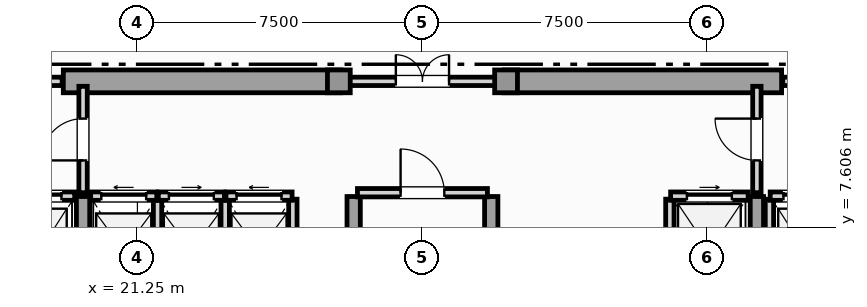
"""IFC4 building model, lengths in metres.
Left out: names, types, materials, properties, quantities, classifications, styles, units other than length and angle.
Written with IfcOpenShell. Run it as: python <this file> out.ifc"""

import sys

from ifc_helpers import new_model, si_unit, direction, frame, frame_2d, origin, origin_2d, place, context, subcontext, project, spatial, rectangle, extrude, element, fill, save


model = new_model("IFC4")
c1 = context("Model", 3, precision=1e-05, world=origin(), true_north=direction((0.0, 1.0)))
c2 = subcontext(c1, "Body", "Model", "MODEL_VIEW")
j1 = project(units=[si_unit("LENGTHUNIT", "METRE"), si_unit("PLANEANGLEUNIT", "RADIAN")], contexts=[c1])
p1 = place(None, origin())
s1 = spatial("IfcSite", under=j1, at=p1, CompositionType="ELEMENT")
p2 = place(p1, origin())
s2 = spatial("IfcBuilding", under=s1, at=p2, CompositionType="ELEMENT")
p3 = place(p2, frame((0.0, 0.0, 256.75)))
s3 = spatial("IfcBuildingStorey", under=s2, at=p3, CompositionType="ELEMENT", Elevation=256.75)
for number, where, z_axis, x_axis in (
    (1, (19.3, 11.45, 0.0), (0.0, 0.0, 1.0), (1.0, 0.0, 0.0)),
    (2, (30.9, 11.45, 0.0), (0.0, 0.0, 1.0), (1.0, 0.0, 0.0)),
):
    element("IfcWall", number, at=place(p3, frame(where, z_axis=z_axis, x_axis=x_axis)), inside=s3, PredefinedType="SHEAR", context=c2, shape_type="SweptSolid", body=[
        extrude(rectangle(XDim=7.3, YDim=0.6, at=frame_2d((3.65, 0.0))), origin(), (0.0, 0.0, 1.0), 3.65),
    ])
for number, where, z_axis, x_axis in (
    (3, (19.82, 0.92, 0.0), (0.0, 0.0, 1.0), (0.0, 1.0, 0.0)),
    (4, (26.94, 0.92, 0.0), (0.0, 0.0, 1.0), (0.0, 1.0, 0.0)),
    (5, (30.56, 0.92, 0.0), (0.0, 0.0, 1.0), (0.0, 1.0, 0.0)),
    (6, (37.55, 0.92, 0.0), (0.0, 0.0, 1.0), (0.0, 1.0, 0.0)),
):
    element("IfcWall", number, at=place(p3, frame(where, z_axis=z_axis, x_axis=x_axis)), inside=s3, PredefinedType="SHEAR", context=c2, shape_type="SweptSolid", body=[
        extrude(rectangle(XDim=7.5, YDim=0.35, at=frame_2d((3.75, 0.0))), origin(), (0.0, 0.0, 1.0), 3.65),
    ])
for number, where, z_axis, x_axis in (
    (7, (26.55, 11.45, 0.0), (0.0, 0.0, 1.0), (1.0, 0.0, 0.0)),
    (8, (30.95, 11.45, 0.0), (0.0, 0.0, 1.0), (1.0, 0.0, 0.0)),
):
    element("IfcColumn", number, at=place(p3, frame(where, z_axis=z_axis, x_axis=x_axis)), inside=s3, PredefinedType="COLUMN", context=c2, shape_type="SweptSolid", body=[
        extrude(rectangle(XDim=0.6, YDim=0.6, at=origin_2d()), origin(), (0.0, 0.0, 1.0), 3.85),
    ])
p4 = place(p3, frame((17.78, 8.43, 0.0), z_axis=(0.0, 0.0, 1.0), x_axis=(1.0, 0.0, 0.0)))
e9 = element("IfcWall", 9, at=p4, inside=s3, PredefinedType="SOLIDWALL", context=c2, shape_type="SweptSolid", body=[
    extrude(rectangle(XDim=1.82, YDim=0.22, at=frame_2d((0.91, 0.0))), origin(), (0.0, 0.0, 1.0), 3.65),
])
p5 = place(p4, frame((0.35, 0.0, 0.0)))
e10 = element("IfcOpeningElement", 10, at=p5, cuts=e9, PredefinedType="OPENING", context=c2, shape_type="SweptSolid", body=[
    extrude(rectangle(XDim=1.12, YDim=2.25, at=frame_2d((0.56, 1.125))), frame((0.0, 0.12, 0.0), z_axis=(0.0, -1.0, 0.0), x_axis=(1.0, 0.0, 0.0)), (0.0, 0.0, 1.0), 0.24),
])
p6 = place(p3, frame((37.88, 5.65, 0.0), z_axis=(0.0, 0.0, 1.0), x_axis=(0.0, 1.0, 0.0)))
e11 = element("IfcWall", 11, at=p6, inside=s3, PredefinedType="SOLIDWALL", context=c2, shape_type="SweptSolid", body=[
    extrude(rectangle(XDim=2.7, YDim=0.22, at=frame_2d((1.35, 0.0))), origin(), (0.0, 0.0, 1.0), 3.65),
])
p7 = place(p3, frame((37.9, 8.43, 0.0), z_axis=(0.0, 0.0, 1.0), x_axis=(1.0, 0.0, 0.0)))
e12 = element("IfcWall", 12, at=p7, inside=s3, PredefinedType="SOLIDWALL", context=c2, shape_type="SweptSolid", body=[
    extrude(rectangle(XDim=1.82, YDim=0.22, at=frame_2d((0.91, 0.0))), origin(), (0.0, 0.0, 1.0), 3.65),
])
p8 = place(p7, frame((0.35, 0.0, 0.0)))
e13 = element("IfcOpeningElement", 13, at=p8, cuts=e12, PredefinedType="OPENING", context=c2, shape_type="SweptSolid", body=[
    extrude(rectangle(XDim=1.12, YDim=2.25, at=frame_2d((0.56, 1.125))), frame((0.0, 0.12, 0.0), z_axis=(0.0, -1.0, 0.0), x_axis=(1.0, 0.0, 0.0)), (0.0, 0.0, 1.0), 0.24),
])
p9 = place(p3, frame((35.26, 5.65, 0.0), z_axis=(0.0, 0.0, 1.0), x_axis=(0.0, 1.0, 0.0)))
e14 = element("IfcWall", 14, at=p9, inside=s3, PredefinedType="SOLIDWALL", context=c2, shape_type="SweptSolid", body=[
    extrude(rectangle(XDim=2.7, YDim=0.22, at=frame_2d((1.35, 0.0))), origin(), (0.0, 0.0, 1.0), 3.65),
])
p10 = place(p3, frame((35.28, 8.43, 0.0), z_axis=(0.0, 0.0, 1.0), x_axis=(1.0, 0.0, 0.0)))
e15 = element("IfcWall", 15, at=p10, inside=s3, PredefinedType="SOLIDWALL", context=c2, shape_type="SweptSolid", body=[
    extrude(rectangle(XDim=2.04, YDim=0.22, at=frame_2d((1.02, 0.0))), origin(), (0.0, 0.0, 1.0), 3.65),
])
p11 = place(p10, frame((0.43, 0.0, 0.0)))
e16 = element("IfcOpeningElement", 16, at=p11, cuts=e15, PredefinedType="OPENING", context=c2, shape_type="SweptSolid", body=[
    extrude(rectangle(XDim=1.18, YDim=2.2, at=frame_2d((0.59, 1.1))), frame((0.0, 0.12, 0.0), z_axis=(0.0, -1.0, 0.0), x_axis=(1.0, 0.0, 0.0)), (0.0, 0.0, 1.0), 0.24),
])
p12 = place(p3, frame((21.78, 5.65, 0.0), z_axis=(0.0, 0.0, 1.0), x_axis=(0.0, 1.0, 0.0)))
e17 = element("IfcWall", 17, at=p12, inside=s3, PredefinedType="SOLIDWALL", context=c2, shape_type="SweptSolid", body=[
    extrude(rectangle(XDim=2.7, YDim=0.22, at=frame_2d((1.35, 0.0))), origin(), (0.0, 0.0, 1.0), 3.65),
])
p13 = place(p3, frame((20.02, 8.43, 0.0), z_axis=(0.0, 0.0, 1.0), x_axis=(1.0, 0.0, 0.0)))
e18 = element("IfcWall", 18, at=p13, inside=s3, PredefinedType="SOLIDWALL", context=c2, shape_type="SweptSolid", body=[
    extrude(rectangle(XDim=1.74, YDim=0.22, at=frame_2d((0.87, 0.0))), origin(), (0.0, 0.0, 1.0), 3.65),
])
p14 = place(p13, frame((0.28, 0.0, 0.0)))
e19 = element("IfcOpeningElement", 19, at=p14, cuts=e18, PredefinedType="OPENING", context=c2, shape_type="SweptSolid", body=[
    extrude(rectangle(XDim=1.18, YDim=2.2, at=frame_2d((0.59, 1.1))), frame((0.0, 0.12, 0.0), z_axis=(0.0, -1.0, 0.0), x_axis=(1.0, 0.0, 0.0)), (0.0, 0.0, 1.0), 0.24),
])
p15 = place(p3, frame((23.56, 5.65, 0.0), z_axis=(0.0, 0.0, 1.0), x_axis=(0.0, 1.0, 0.0)))
e20 = element("IfcWall", 20, at=p15, inside=s3, PredefinedType="SOLIDWALL", context=c2, shape_type="SweptSolid", body=[
    extrude(rectangle(XDim=2.7, YDim=0.22, at=frame_2d((1.35, 0.0))), origin(), (0.0, 0.0, 1.0), 3.65),
])
p16 = place(p3, frame((21.8, 8.43, 0.0), z_axis=(0.0, 0.0, 1.0), x_axis=(1.0, 0.0, 0.0)))
e21 = element("IfcWall", 21, at=p16, inside=s3, PredefinedType="SOLIDWALL", context=c2, shape_type="SweptSolid", body=[
    extrude(rectangle(XDim=1.74, YDim=0.22, at=frame_2d((0.87, 0.0))), origin(), (0.0, 0.0, 1.0), 3.65),
])
p17 = place(p16, frame((0.28, 0.0, 0.0)))
e22 = element("IfcOpeningElement", 22, at=p17, cuts=e21, PredefinedType="OPENING", context=c2, shape_type="SweptSolid", body=[
    extrude(rectangle(XDim=1.18, YDim=2.2, at=frame_2d((0.59, 1.1))), frame((0.0, 0.12, 0.0), z_axis=(0.0, -1.0, 0.0), x_axis=(1.0, 0.0, 0.0)), (0.0, 0.0, 1.0), 0.24),
])
p18 = place(p3, frame((25.34, 5.65, 0.0), z_axis=(0.0, 0.0, 1.0), x_axis=(0.0, 1.0, 0.0)))
e23 = element("IfcWall", 23, at=p18, inside=s3, PredefinedType="SOLIDWALL", context=c2, shape_type="SweptSolid", body=[
    extrude(rectangle(XDim=2.7, YDim=0.22, at=frame_2d((1.35, 0.0))), origin(), (0.0, 0.0, 1.0), 3.65),
])
p19 = place(p3, frame((23.58, 8.43, 0.0), z_axis=(0.0, 0.0, 1.0), x_axis=(1.0, 0.0, 0.0)))
e24 = element("IfcWall", 24, at=p19, inside=s3, PredefinedType="SOLIDWALL", context=c2, shape_type="SweptSolid", body=[
    extrude(rectangle(XDim=1.74, YDim=0.22, at=frame_2d((0.87, 0.0))), origin(), (0.0, 0.0, 1.0), 3.65),
])
p20 = place(p19, frame((0.28, 0.0, 0.0)))
e25 = element("IfcOpeningElement", 25, at=p20, cuts=e24, PredefinedType="OPENING", context=c2, shape_type="SweptSolid", body=[
    extrude(rectangle(XDim=1.18, YDim=2.2, at=frame_2d((0.59, 1.1))), frame((0.0, 0.12, 0.0), z_axis=(0.0, -1.0, 0.0), x_axis=(1.0, 0.0, 0.0)), (0.0, 0.0, 1.0), 0.24),
])
p21 = place(p3, frame((27.04, 8.52, 0.0), z_axis=(0.0, 0.0, 1.0), x_axis=(1.0, 0.0, 0.0)))
e26 = element("IfcWall", 26, at=p21, inside=s3, PredefinedType="SOLIDWALL", context=c2, shape_type="SweptSolid", body=[
    extrude(rectangle(XDim=3.42, YDim=0.22, at=frame_2d((1.71, 0.0))), origin(), (0.0, 0.0, 1.0), 3.65),
])
p22 = place(p21, frame((1.135, 0.0, 0.0)))
e27 = element("IfcOpeningElement", 27, at=p22, cuts=e26, PredefinedType="OPENING", context=c2, shape_type="SweptSolid", body=[
    extrude(rectangle(XDim=1.15, YDim=2.2, at=frame_2d((0.575, 1.1))), frame((0.0, 0.12, 0.0), z_axis=(0.0, -1.0, 0.0), x_axis=(1.0, 0.0, 0.0)), (0.0, 0.0, 1.0), 0.24),
])
p23 = place(p3, frame((19.82, 8.52, 0.0), z_axis=(0.0, 0.0, 1.0), x_axis=(0.0, 1.0, 0.0)))
e28 = element("IfcWall", 28, at=p23, inside=s3, PredefinedType="SOLIDWALL", context=c2, shape_type="SweptSolid", body=[
    extrude(rectangle(XDim=2.8, YDim=0.22, at=frame_2d((1.4, 0.0))), origin(), (0.0, 0.0, 1.0), 3.105),
])
p24 = place(p23, frame((0.85, 0.0, 0.0)))
e29 = element("IfcOpeningElement", 29, at=p24, cuts=e28, PredefinedType="OPENING", context=c2, shape_type="SweptSolid", body=[
    extrude(rectangle(XDim=1.1, YDim=2.2, at=frame_2d((0.55, 1.1))), frame((0.0, 0.12, 0.0), z_axis=(0.0, -1.0, 0.0), x_axis=(1.0, 0.0, 0.0)), (0.0, 0.0, 1.0), 0.24),
])
p25 = place(p3, frame((37.55, 8.52, 0.0), z_axis=(0.0, 0.0, 1.0), x_axis=(0.0, 1.0, 0.0)))
e30 = element("IfcWall", 30, at=p25, inside=s3, PredefinedType="SOLIDWALL", context=c2, shape_type="SweptSolid", body=[
    extrude(rectangle(XDim=2.8, YDim=0.22, at=frame_2d((1.4, 0.0))), origin(), (0.0, 0.0, 1.0), 3.105),
])
p26 = place(p25, frame((0.85, 0.0, 0.0)))
e31 = element("IfcOpeningElement", 31, at=p26, cuts=e30, PredefinedType="OPENING", context=c2, shape_type="SweptSolid", body=[
    extrude(rectangle(XDim=1.1, YDim=2.2, at=frame_2d((0.55, 1.1))), frame((0.0, 0.12, 0.0), z_axis=(0.0, -1.0, 0.0), x_axis=(1.0, 0.0, 0.0)), (0.0, 0.0, 1.0), 0.24),
])
p27 = place(p3, frame((16.23, 11.45, 0.0), z_axis=(0.0, 0.0, 1.0), x_axis=(1.0, 0.0, 0.0)))
e32 = element("IfcWall", 32, at=p27, inside=s3, PredefinedType="SOLIDWALL", context=c2, shape_type="SweptSolid", body=[
    extrude(rectangle(XDim=3.04, YDim=0.22, at=frame_2d((1.52, 0.0))), origin(), (0.0, 0.0, 1.0), 3.65),
])
p28 = place(p27, frame((0.97, 0.0, 0.0)))
e33 = element("IfcOpeningElement", 33, at=p28, cuts=e32, PredefinedType="OPENING", context=c2, shape_type="SweptSolid", body=[
    extrude(rectangle(XDim=1.1, YDim=2.2, at=frame_2d((0.55, 1.1))), frame((0.0, 0.12, 0.0), z_axis=(0.0, -1.0, 0.0), x_axis=(1.0, 0.0, 0.0)), (0.0, 0.0, 1.0), 0.24),
])
p29 = place(p3, frame((26.63, 11.45, 0.0), z_axis=(0.0, 0.0, 1.0), x_axis=(1.0, 0.0, 0.0)))
e34 = element("IfcWall", 34, at=p29, inside=s3, PredefinedType="SOLIDWALL", context=c2, shape_type="SweptSolid", body=[
    extrude(rectangle(XDim=4.24, YDim=0.22, at=frame_2d((2.12, 0.0))), origin(), (0.0, 0.0, 1.0), 3.65),
])
p30 = place(p29, frame((1.42, 0.0, 0.0)))
e35 = element("IfcOpeningElement", 35, at=p30, cuts=e34, PredefinedType="OPENING", context=c2, shape_type="SweptSolid", body=[
    extrude(rectangle(XDim=1.4, YDim=2.2, at=frame_2d((0.7, 1.1))), frame((0.0, 0.12, 0.0), z_axis=(0.0, -1.0, 0.0), x_axis=(1.0, 0.0, 0.0)), (0.0, 0.0, 1.0), 0.24),
])
p31 = place(p3, frame((38.23, 11.45, 0.0), z_axis=(0.0, 0.0, 1.0), x_axis=(1.0, 0.0, 0.0)))
e36 = element("IfcWall", 36, at=p31, inside=s3, PredefinedType="SOLIDWALL", context=c2, shape_type="SweptSolid", body=[
    extrude(rectangle(XDim=3.04, YDim=0.22, at=frame_2d((1.52, 0.0))), origin(), (0.0, 0.0, 1.0), 3.65),
])
p32 = place(p31, frame((0.97, 0.0, 0.0)))
e37 = element("IfcOpeningElement", 37, at=p32, cuts=e36, PredefinedType="OPENING", context=c2, shape_type="SweptSolid", body=[
    extrude(rectangle(XDim=1.1, YDim=2.2, at=frame_2d((0.55, 1.1))), frame((0.0, 0.12, 0.0), z_axis=(0.0, -1.0, 0.0), x_axis=(1.0, 0.0, 0.0)), (0.0, 0.0, 1.0), 0.24),
])
p33 = place(p5, origin())
e38 = element("IfcDoor", 38, at=p33, inside=s3, OperationType="SLIDING_TO_RIGHT", PredefinedType="DOOR", context=c2, shape_type="SweptSolid", body=[
    extrude(rectangle(XDim=1.12, YDim=2.25, at=frame_2d((0.56, 1.125))), frame((0.0, 0.025, 0.0), z_axis=(0.0, -1.0, 0.0), x_axis=(1.0, 0.0, 0.0)), (0.0, 0.0, 1.0), 0.05),
])
fill(e10, e38)
p34 = place(p8, origin())
e39 = element("IfcDoor", 39, at=p34, inside=s3, OperationType="SLIDING_TO_LEFT", PredefinedType="DOOR", context=c2, shape_type="SweptSolid", body=[
    extrude(rectangle(XDim=1.12, YDim=2.25, at=frame_2d((0.56, 1.125))), frame((0.0, 0.025, 0.0), z_axis=(0.0, -1.0, 0.0), x_axis=(1.0, 0.0, 0.0)), (0.0, 0.0, 1.0), 0.05),
])
fill(e13, e39)
p35 = place(p11, origin())
e40 = element("IfcDoor", 40, at=p35, inside=s3, OperationType="SLIDING_TO_RIGHT", PredefinedType="DOOR", context=c2, shape_type="SweptSolid", body=[
    extrude(rectangle(XDim=1.18, YDim=2.2, at=frame_2d((0.59, 1.1))), frame((0.0, 0.025, 0.0), z_axis=(0.0, -1.0, 0.0), x_axis=(1.0, 0.0, 0.0)), (0.0, 0.0, 1.0), 0.05),
])
fill(e16, e40)
p36 = place(p14, origin())
e41 = element("IfcDoor", 41, at=p36, inside=s3, OperationType="SLIDING_TO_LEFT", PredefinedType="DOOR", context=c2, shape_type="SweptSolid", body=[
    extrude(rectangle(XDim=1.18, YDim=2.2, at=frame_2d((0.59, 1.1))), frame((0.0, 0.025, 0.0), z_axis=(0.0, -1.0, 0.0), x_axis=(1.0, 0.0, 0.0)), (0.0, 0.0, 1.0), 0.05),
])
fill(e19, e41)
p37 = place(p17, origin())
e42 = element("IfcDoor", 42, at=p37, inside=s3, OperationType="SLIDING_TO_RIGHT", PredefinedType="DOOR", context=c2, shape_type="SweptSolid", body=[
    extrude(rectangle(XDim=1.18, YDim=2.2, at=frame_2d((0.59, 1.1))), frame((0.0, 0.025, 0.0), z_axis=(0.0, -1.0, 0.0), x_axis=(1.0, 0.0, 0.0)), (0.0, 0.0, 1.0), 0.05),
])
fill(e22, e42)
p38 = place(p20, origin())
e43 = element("IfcDoor", 43, at=p38, inside=s3, OperationType="SLIDING_TO_LEFT", PredefinedType="DOOR", context=c2, shape_type="SweptSolid", body=[
    extrude(rectangle(XDim=1.18, YDim=2.2, at=frame_2d((0.59, 1.1))), frame((0.0, 0.025, 0.0), z_axis=(0.0, -1.0, 0.0), x_axis=(1.0, 0.0, 0.0)), (0.0, 0.0, 1.0), 0.05),
])
fill(e25, e43)
p39 = place(p22, origin())
e44 = element("IfcDoor", 44, at=p39, inside=s3, OperationType="SINGLE_SWING_LEFT", PredefinedType="DOOR", context=c2, shape_type="SweptSolid", body=[
    extrude(rectangle(XDim=1.15, YDim=2.2, at=frame_2d((0.575, 1.1))), frame((0.0, 0.025, 0.0), z_axis=(0.0, -1.0, 0.0), x_axis=(1.0, 0.0, 0.0)), (0.0, 0.0, 1.0), 0.05),
])
fill(e27, e44)
p40 = place(p24, origin())
e45 = element("IfcDoor", 45, at=p40, inside=s3, OperationType="SINGLE_SWING_LEFT", PredefinedType="DOOR", context=c2, shape_type="SweptSolid", body=[
    extrude(rectangle(XDim=1.1, YDim=2.2, at=frame_2d((0.55, 1.1))), frame((0.0, 0.025, 0.0), z_axis=(0.0, -1.0, 0.0), x_axis=(1.0, 0.0, 0.0)), (0.0, 0.0, 1.0), 0.05),
])
fill(e29, e45)
p41 = place(p26, origin())
e46 = element("IfcDoor", 46, at=p41, inside=s3, OperationType="SINGLE_SWING_RIGHT", PredefinedType="DOOR", context=c2, shape_type="SweptSolid", body=[
    extrude(rectangle(XDim=1.1, YDim=2.2, at=frame_2d((0.55, 1.1))), frame((0.0, 0.025, 0.0), z_axis=(0.0, -1.0, 0.0), x_axis=(1.0, 0.0, 0.0)), (0.0, 0.0, 1.0), 0.05),
])
fill(e31, e46)
p42 = place(p30, origin())
e47 = element("IfcDoor", 47, at=p42, inside=s3, OperationType="DOUBLE_DOOR_SINGLE_SWING", PredefinedType="DOOR", context=c2, shape_type="SweptSolid", body=[
    extrude(rectangle(XDim=1.4, YDim=2.2, at=frame_2d((0.7, 1.1))), frame((0.0, 0.025, 0.0), z_axis=(0.0, -1.0, 0.0), x_axis=(1.0, 0.0, 0.0)), (0.0, 0.0, 1.0), 0.05),
])
fill(e35, e47)
save(model, sys.argv[1])
